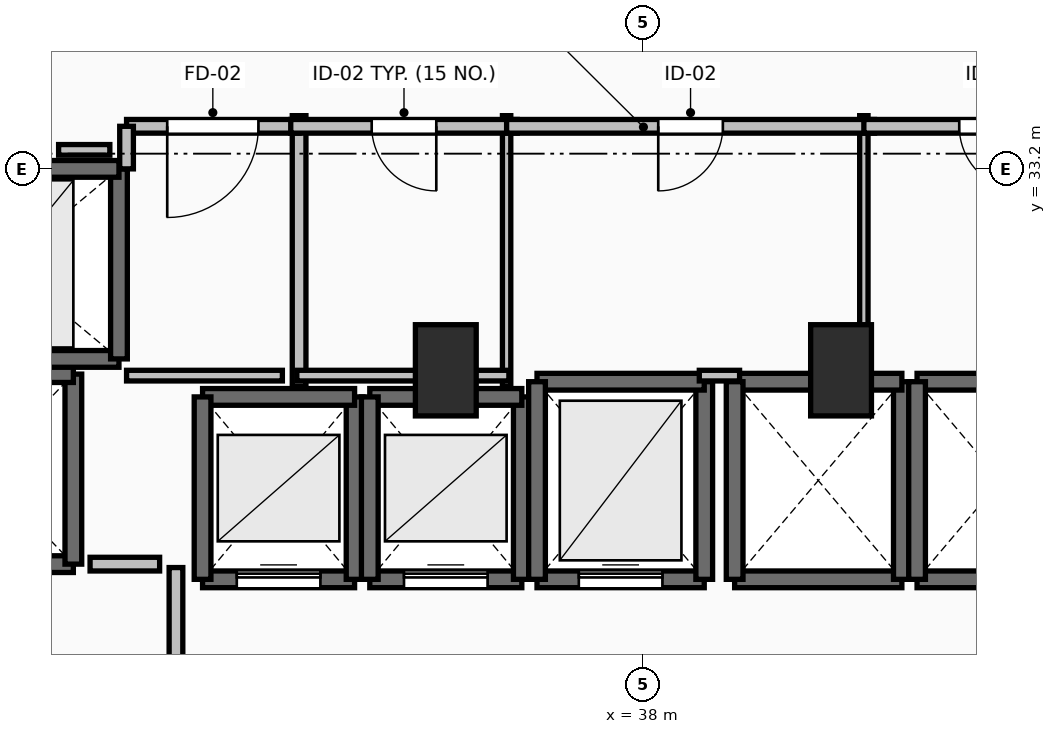
"""IFC4 building model, lengths in metres.
Left out: names, types, materials, properties, quantities, classifications, styles, units other than length and angle.
Written with IfcOpenShell. Run it as: python <this file> out.ifc"""

import sys

from ifc_helpers import new_model, si_unit, direction, frame, frame_2d, origin, origin_2d, place, context, subcontext, project, spatial, rectangle, extrude, element, fill, save


model = new_model("IFC4")
c1 = context("Model", 3, precision=1e-05, world=origin(), true_north=direction((0.0, 1.0)))
c2 = subcontext(c1, "Body", "Model", "MODEL_VIEW")
j1 = project(units=[si_unit("LENGTHUNIT", "METRE"), si_unit("PLANEANGLEUNIT", "RADIAN")], contexts=[c1])
p1 = place(None, origin())
s1 = spatial("IfcSite", under=j1, at=p1, CompositionType="ELEMENT")
p2 = place(p1, origin())
s2 = spatial("IfcBuilding", under=s1, at=p2, CompositionType="ELEMENT")
p3 = place(p2, frame((0.0, 0.0, 117.3)))
s3 = spatial("IfcBuildingStorey", under=s2, at=p3, CompositionType="ELEMENT", Elevation=117.3)
for number, where, z_axis, x_axis in (
    (1, (35.4, 30.55, 0.0), (0.0, 0.0, 1.0), (1.0, 0.0, 0.0)),
    (2, (40.6, 30.55, 0.0), (0.0, 0.0, 1.0), (1.0, 0.0, 0.0)),
):
    element("IfcColumn", number, at=place(p3, frame(where, z_axis=z_axis, x_axis=x_axis)), inside=s3, PredefinedType="PILASTER", context=c2, shape_type="SweptSolid", body=[
        extrude(rectangle(XDim=0.8, YDim=1.2, at=origin_2d()), origin(), (0.0, 0.0, 1.0), 3.5),
    ])
p4 = place(p3, frame((32.2, 27.8, 0.0), z_axis=(0.0, 0.0, 1.0), x_axis=(1.0, 0.0, 0.0)))
e3 = element("IfcWall", 3, at=p4, inside=s3, PredefinedType="SOLIDWALL", context=c2, shape_type="SweptSolid", body=[
    extrude(rectangle(XDim=2.0, YDim=0.22, at=frame_2d((1.0, 0.0))), origin(), (0.0, 0.0, 1.0), 3.24),
])
p5 = place(p4, frame((0.45, 0.0, 0.0)))
e4 = element("IfcOpeningElement", 4, at=p5, cuts=e3, PredefinedType="OPENING", context=c2, shape_type="SweptSolid", body=[
    extrude(rectangle(XDim=1.1, YDim=2.2, at=frame_2d((0.55, 1.1))), frame((0.0, 0.125, 0.0), z_axis=(0.0, -1.0, 0.0), x_axis=(1.0, 0.0, 0.0)), (0.0, 0.0, 1.0), 0.25),
])
p6 = place(p3, frame((34.2, 27.8, 0.0), z_axis=(0.0, 0.0, 1.0), x_axis=(0.0, 1.0, 0.0)))
e5 = element("IfcWall", 5, at=p6, inside=s3, PredefinedType="SOLIDWALL", context=c2, shape_type="SweptSolid", body=[
    extrude(rectangle(XDim=2.4, YDim=0.22, at=frame_2d((1.2, 0.0))), origin(), (0.0, 0.0, 1.0), 3.24),
])
p7 = place(p3, frame((34.2, 30.2, 0.0), z_axis=(0.0, 0.0, 1.0), x_axis=(-1.0, 0.0, 0.0)))
e6 = element("IfcWall", 6, at=p7, inside=s3, PredefinedType="SOLIDWALL", context=c2, shape_type="SweptSolid", body=[
    extrude(rectangle(XDim=2.0, YDim=0.22, at=frame_2d((1.0, 0.0))), origin(), (0.0, 0.0, 1.0), 3.24),
])
p8 = place(p3, frame((32.2, 30.2, 0.0), z_axis=(0.0, 0.0, 1.0), x_axis=(0.0, -1.0, 0.0)))
e7 = element("IfcWall", 7, at=p8, inside=s3, PredefinedType="SOLIDWALL", context=c2, shape_type="SweptSolid", body=[
    extrude(rectangle(XDim=2.4, YDim=0.22, at=frame_2d((1.2, 0.0))), origin(), (0.0, 0.0, 1.0), 3.24),
])
p9 = place(p3, frame((34.4, 27.8, 0.0), z_axis=(0.0, 0.0, 1.0), x_axis=(1.0, 0.0, 0.0)))
e8 = element("IfcWall", 8, at=p9, inside=s3, PredefinedType="SOLIDWALL", context=c2, shape_type="SweptSolid", body=[
    extrude(rectangle(XDim=2.0, YDim=0.22, at=frame_2d((1.0, 0.0))), origin(), (0.0, 0.0, 1.0), 3.24),
])
p10 = place(p9, frame((0.45, 0.0, 0.0)))
e9 = element("IfcOpeningElement", 9, at=p10, cuts=e8, PredefinedType="OPENING", context=c2, shape_type="SweptSolid", body=[
    extrude(rectangle(XDim=1.1, YDim=2.2, at=frame_2d((0.55, 1.1))), frame((0.0, 0.125, 0.0), z_axis=(0.0, -1.0, 0.0), x_axis=(1.0, 0.0, 0.0)), (0.0, 0.0, 1.0), 0.25),
])
p11 = place(p3, frame((36.4, 27.8, 0.0), z_axis=(0.0, 0.0, 1.0), x_axis=(0.0, 1.0, 0.0)))
e10 = element("IfcWall", 10, at=p11, inside=s3, PredefinedType="SOLIDWALL", context=c2, shape_type="SweptSolid", body=[
    extrude(rectangle(XDim=2.4, YDim=0.22, at=frame_2d((1.2, 0.0))), origin(), (0.0, 0.0, 1.0), 3.24),
])
p12 = place(p3, frame((36.4, 30.2, 0.0), z_axis=(0.0, 0.0, 1.0), x_axis=(-1.0, 0.0, 0.0)))
e11 = element("IfcWall", 11, at=p12, inside=s3, PredefinedType="SOLIDWALL", context=c2, shape_type="SweptSolid", body=[
    extrude(rectangle(XDim=2.0, YDim=0.22, at=frame_2d((1.0, 0.0))), origin(), (0.0, 0.0, 1.0), 3.24),
])
p13 = place(p3, frame((34.4, 30.2, 0.0), z_axis=(0.0, 0.0, 1.0), x_axis=(0.0, -1.0, 0.0)))
e12 = element("IfcWall", 12, at=p13, inside=s3, PredefinedType="SOLIDWALL", context=c2, shape_type="SweptSolid", body=[
    extrude(rectangle(XDim=2.4, YDim=0.22, at=frame_2d((1.2, 0.0))), origin(), (0.0, 0.0, 1.0), 3.24),
])
p14 = place(p3, frame((36.6, 27.8, 0.0), z_axis=(0.0, 0.0, 1.0), x_axis=(1.0, 0.0, 0.0)))
e13 = element("IfcWall", 13, at=p14, inside=s3, PredefinedType="SOLIDWALL", context=c2, shape_type="SweptSolid", body=[
    extrude(rectangle(XDim=2.2, YDim=0.22, at=frame_2d((1.1, 0.0))), origin(), (0.0, 0.0, 1.0), 3.24),
])
p15 = place(p14, frame((0.55, 0.0, 0.0)))
e14 = element("IfcOpeningElement", 14, at=p15, cuts=e13, PredefinedType="OPENING", context=c2, shape_type="SweptSolid", body=[
    extrude(rectangle(XDim=1.1, YDim=2.2, at=frame_2d((0.55, 1.1))), frame((0.0, 0.125, 0.0), z_axis=(0.0, -1.0, 0.0), x_axis=(1.0, 0.0, 0.0)), (0.0, 0.0, 1.0), 0.25),
])
p16 = place(p3, frame((38.8, 27.8, 0.0), z_axis=(0.0, 0.0, 1.0), x_axis=(0.0, 1.0, 0.0)))
e15 = element("IfcWall", 15, at=p16, inside=s3, PredefinedType="SOLIDWALL", context=c2, shape_type="SweptSolid", body=[
    extrude(rectangle(XDim=2.6, YDim=0.22, at=frame_2d((1.3, 0.0))), origin(), (0.0, 0.0, 1.0), 3.24),
])
p17 = place(p3, frame((38.8, 30.4, 0.0), z_axis=(0.0, 0.0, 1.0), x_axis=(-1.0, 0.0, 0.0)))
e16 = element("IfcWall", 16, at=p17, inside=s3, PredefinedType="SOLIDWALL", context=c2, shape_type="SweptSolid", body=[
    extrude(rectangle(XDim=2.2, YDim=0.22, at=frame_2d((1.1, 0.0))), origin(), (0.0, 0.0, 1.0), 3.24),
])
p18 = place(p3, frame((36.6, 30.4, 0.0), z_axis=(0.0, 0.0, 1.0), x_axis=(0.0, -1.0, 0.0)))
e17 = element("IfcWall", 17, at=p18, inside=s3, PredefinedType="SOLIDWALL", context=c2, shape_type="SweptSolid", body=[
    extrude(rectangle(XDim=2.6, YDim=0.22, at=frame_2d((1.3, 0.0))), origin(), (0.0, 0.0, 1.0), 3.24),
])
p19 = place(p3, frame((39.2, 27.8, 0.0), z_axis=(0.0, 0.0, 1.0), x_axis=(1.0, 0.0, 0.0)))
e18 = element("IfcWall", 18, at=p19, inside=s3, PredefinedType="SOLIDWALL", context=c2, shape_type="SweptSolid", body=[
    extrude(rectangle(XDim=2.2, YDim=0.22, at=frame_2d((1.1, 0.0))), origin(), (0.0, 0.0, 1.0), 3.24),
])
p20 = place(p3, frame((41.4, 27.8, 0.0), z_axis=(0.0, 0.0, 1.0), x_axis=(0.0, 1.0, 0.0)))
e19 = element("IfcWall", 19, at=p20, inside=s3, PredefinedType="SOLIDWALL", context=c2, shape_type="SweptSolid", body=[
    extrude(rectangle(XDim=2.6, YDim=0.22, at=frame_2d((1.3, 0.0))), origin(), (0.0, 0.0, 1.0), 3.24),
])
p21 = place(p3, frame((41.4, 30.4, 0.0), z_axis=(0.0, 0.0, 1.0), x_axis=(-1.0, 0.0, 0.0)))
e20 = element("IfcWall", 20, at=p21, inside=s3, PredefinedType="SOLIDWALL", context=c2, shape_type="SweptSolid", body=[
    extrude(rectangle(XDim=2.2, YDim=0.22, at=frame_2d((1.1, 0.0))), origin(), (0.0, 0.0, 1.0), 3.24),
])
p22 = place(p3, frame((39.2, 30.4, 0.0), z_axis=(0.0, 0.0, 1.0), x_axis=(0.0, -1.0, 0.0)))
e21 = element("IfcWall", 21, at=p22, inside=s3, PredefinedType="SOLIDWALL", context=c2, shape_type="SweptSolid", body=[
    extrude(rectangle(XDim=2.6, YDim=0.22, at=frame_2d((1.3, 0.0))), origin(), (0.0, 0.0, 1.0), 3.24),
])
for number, where, z_axis, x_axis in (
    (22, (41.6, 27.8, 0.0), (0.0, 0.0, 1.0), (1.0, 0.0, 0.0)),
    (23, (43.8, 30.4, 0.0), (0.0, 0.0, 1.0), (-1.0, 0.0, 0.0)),
):
    element("IfcWall", number, at=place(p3, frame(where, z_axis=z_axis, x_axis=x_axis)), inside=s3, PredefinedType="SOLIDWALL", context=c2, shape_type="SweptSolid", body=[
        extrude(rectangle(XDim=2.2, YDim=0.22, at=frame_2d((1.1, 0.0))), origin(), (0.0, 0.0, 1.0), 3.24),
    ])
p23 = place(p3, frame((41.6, 30.4, 0.0), z_axis=(0.0, 0.0, 1.0), x_axis=(0.0, -1.0, 0.0)))
e24 = element("IfcWall", 24, at=p23, inside=s3, PredefinedType="SOLIDWALL", context=c2, shape_type="SweptSolid", body=[
    extrude(rectangle(XDim=2.6, YDim=0.22, at=frame_2d((1.3, 0.0))), origin(), (0.0, 0.0, 1.0), 3.24),
])
p24 = place(p3, frame((28.1, 28.0, 0.0), z_axis=(0.0, 0.0, 1.0), x_axis=(1.0, 0.0, 0.0)))
e25 = element("IfcWall", 25, at=p24, inside=s3, PredefinedType="SHEAR", context=c2, shape_type="SweptSolid", body=[
    extrude(rectangle(XDim=2.4, YDim=0.22, at=frame_2d((1.2, 0.0))), origin(), (0.0, 0.0, 1.0), 3.24),
])
p25 = place(p24, frame((0.6, 0.0, 0.0)))
e26 = element("IfcOpeningElement", 26, at=p25, cuts=e25, PredefinedType="OPENING", context=c2, shape_type="SweptSolid", body=[
    extrude(rectangle(XDim=1.2, YDim=2.2, at=frame_2d((0.6, 1.1))), frame((0.0, 0.125, 0.0), z_axis=(0.0, -1.0, 0.0), x_axis=(1.0, 0.0, 0.0)), (0.0, 0.0, 1.0), 0.25),
])
p26 = place(p3, frame((30.5, 28.0, 0.0), z_axis=(0.0, 0.0, 1.0), x_axis=(0.0, 1.0, 0.0)))
e27 = element("IfcWall", 27, at=p26, inside=s3, PredefinedType="SHEAR", context=c2, shape_type="SweptSolid", body=[
    extrude(rectangle(XDim=2.5, YDim=0.22, at=frame_2d((1.25, 0.0))), origin(), (0.0, 0.0, 1.0), 3.24),
])
p27 = place(p3, frame((30.5, 30.5, 0.0), z_axis=(0.0, 0.0, 1.0), x_axis=(-1.0, 0.0, 0.0)))
e28 = element("IfcWall", 28, at=p27, inside=s3, PredefinedType="SHEAR", context=c2, shape_type="SweptSolid", body=[
    extrude(rectangle(XDim=2.4, YDim=0.22, at=frame_2d((1.2, 0.0))), origin(), (0.0, 0.0, 1.0), 3.24),
])
p28 = place(p3, frame((28.1, 30.7, 0.0), z_axis=(0.0, 0.0, 1.0), x_axis=(1.0, 0.0, 0.0)))
e29 = element("IfcWall", 29, at=p28, inside=s3, PredefinedType="SOLIDWALL", context=c2, shape_type="SweptSolid", body=[
    extrude(rectangle(XDim=3.0, YDim=0.22, at=frame_2d((1.5, 0.0))), origin(), (0.0, 0.0, 1.0), 3.24),
])
p29 = place(p3, frame((31.1, 30.7, 0.0), z_axis=(0.0, 0.0, 1.0), x_axis=(0.0, 1.0, 0.0)))
e30 = element("IfcWall", 30, at=p29, inside=s3, PredefinedType="SOLIDWALL", context=c2, shape_type="SweptSolid", body=[
    extrude(rectangle(XDim=2.5, YDim=0.22, at=frame_2d((1.25, 0.0))), origin(), (0.0, 0.0, 1.0), 3.24),
])
p30 = place(p3, frame((31.1, 33.2, 0.0), z_axis=(0.0, 0.0, 1.0), x_axis=(-1.0, 0.0, 0.0)))
e31 = element("IfcWall", 31, at=p30, inside=s3, PredefinedType="SOLIDWALL", context=c2, shape_type="SweptSolid", body=[
    extrude(rectangle(XDim=3.0, YDim=0.22, at=frame_2d((1.5, 0.0))), origin(), (0.0, 0.0, 1.0), 3.24),
])
p31 = place(p30, frame((0.9, 0.0, 0.0)))
e32 = element("IfcOpeningElement", 32, at=p31, cuts=e31, PredefinedType="OPENING", context=c2, shape_type="SweptSolid", body=[
    extrude(rectangle(XDim=1.2, YDim=2.2, at=frame_2d((0.6, 1.1))), frame((0.0, 0.125, 0.0), z_axis=(0.0, -1.0, 0.0), x_axis=(1.0, 0.0, 0.0)), (0.0, 0.0, 1.0), 0.25),
])
p32 = place(p3, frame((31.85, 24.045, 0.0), z_axis=(0.0, 0.0, 1.0), x_axis=(0.0, 1.0, 0.0)))
e33 = element("IfcWall", 33, at=p32, inside=s3, PredefinedType="PARTITIONING", context=c2, shape_type="SweptSolid", body=[
    extrude(rectangle(XDim=3.91, YDim=0.18, at=frame_2d((1.955, 0.0))), origin(), (0.0, 0.0, 1.0), 3.24),
])
p33 = place(p32, frame((1.355, 0.0, 0.0)))
e34 = element("IfcOpeningElement", 34, at=p33, cuts=e33, PredefinedType="OPENING", context=c2, shape_type="SweptSolid", body=[
    extrude(rectangle(XDim=1.2, YDim=2.15, at=frame_2d((0.6, 1.075))), frame((0.0, 0.105, 0.0), z_axis=(0.0, -1.0, 0.0), x_axis=(1.0, 0.0, 0.0)), (0.0, 0.0, 1.0), 0.21),
])
p34 = place(p3, frame((33.47, 30.34, 0.0), z_axis=(0.0, 0.0, 1.0), x_axis=(0.0, 1.0, 0.0)))
e35 = element("IfcWall", 35, at=p34, inside=s3, PredefinedType="PARTITIONING", context=c2, shape_type="SweptSolid", body=[
    extrude(rectangle(XDim=3.56, YDim=0.18, at=frame_2d((1.78, 0.0))), origin(), (0.0, 0.0, 1.0), 3.24),
])
p35 = place(p3, frame((33.47, 33.76, 0.0), z_axis=(0.0, 0.0, 1.0), x_axis=(-1.0, 0.0, 0.0)))
e36 = element("IfcWall", 36, at=p35, inside=s3, PredefinedType="PARTITIONING", context=c2, shape_type="SweptSolid", body=[
    extrude(rectangle(XDim=2.27, YDim=0.18, at=frame_2d((1.135, 0.0))), origin(), (0.0, 0.0, 1.0), 3.24),
])
p36 = place(p35, frame((0.535, 0.0, 0.0)))
e37 = element("IfcOpeningElement", 37, at=p36, cuts=e36, PredefinedType="OPENING", context=c2, shape_type="SweptSolid", body=[
    extrude(rectangle(XDim=1.2, YDim=2.15, at=frame_2d((0.6, 1.075))), frame((0.0, 0.105, 0.0), z_axis=(0.0, -1.0, 0.0), x_axis=(1.0, 0.0, 0.0)), (0.0, 0.0, 1.0), 0.21),
])
p37 = place(p3, frame((31.2, 33.76, 0.0), z_axis=(0.0, 0.0, 1.0), x_axis=(0.0, -1.0, 0.0)))
e38 = element("IfcWall", 38, at=p37, inside=s3, PredefinedType="PARTITIONING", context=c2, shape_type="SweptSolid", body=[
    extrude(rectangle(XDim=0.56, YDim=0.18, at=frame_2d((0.28, 0.0))), origin(), (0.0, 0.0, 1.0), 3.24),
])
p38 = place(p3, frame((36.2, 30.34, 0.0), z_axis=(0.0, 0.0, 1.0), x_axis=(0.0, 1.0, 0.0)))
e39 = element("IfcWall", 39, at=p38, inside=s3, PredefinedType="PARTITIONING", context=c2, shape_type="SweptSolid", body=[
    extrude(rectangle(XDim=3.56, YDim=0.11, at=frame_2d((1.78, 0.0))), origin(), (0.0, 0.0, 1.0), 2.432),
])
p39 = place(p3, frame((36.34, 33.76, 0.0), z_axis=(0.0, 0.0, 1.0), x_axis=(-1.0, 0.0, 0.0)))
e40 = element("IfcWall", 40, at=p39, inside=s3, PredefinedType="PARTITIONING", context=c2, shape_type="SweptSolid", body=[
    extrude(rectangle(XDim=2.98, YDim=0.18, at=frame_2d((1.49, 0.0))), origin(), (0.0, 0.0, 1.0), 3.24),
])
p40 = place(p39, frame((1.065, 0.0, 0.0)))
e41 = element("IfcOpeningElement", 41, at=p40, cuts=e40, PredefinedType="OPENING", context=c2, shape_type="SweptSolid", body=[
    extrude(rectangle(XDim=0.85, YDim=2.1, at=frame_2d((0.425, 1.05))), frame((0.0, 0.105, 0.0), z_axis=(0.0, -1.0, 0.0), x_axis=(1.0, 0.0, 0.0)), (0.0, 0.0, 1.0), 0.21),
])
p41 = place(p3, frame((40.9, 30.34, 0.0), z_axis=(0.0, 0.0, 1.0), x_axis=(0.0, 1.0, 0.0)))
e42 = element("IfcWall", 42, at=p41, inside=s3, PredefinedType="PARTITIONING", context=c2, shape_type="SweptSolid", body=[
    extrude(rectangle(XDim=3.56, YDim=0.11, at=frame_2d((1.78, 0.0))), origin(), (0.0, 0.0, 1.0), 3.24),
])
p42 = place(p3, frame((41.04, 33.76, 0.0), z_axis=(0.0, 0.0, 1.0), x_axis=(-1.0, 0.0, 0.0)))
e43 = element("IfcWall", 43, at=p42, inside=s3, PredefinedType="PARTITIONING", context=c2, shape_type="SweptSolid", body=[
    extrude(rectangle(XDim=4.84, YDim=0.18, at=frame_2d((2.42, 0.0))), origin(), (0.0, 0.0, 1.0), 3.24),
])
p43 = place(p42, frame((1.995, 0.0, 0.0)))
e44 = element("IfcOpeningElement", 44, at=p43, cuts=e43, PredefinedType="OPENING", context=c2, shape_type="SweptSolid", body=[
    extrude(rectangle(XDim=0.85, YDim=2.1, at=frame_2d((0.425, 1.05))), frame((0.0, 0.105, 0.0), z_axis=(0.0, -1.0, 0.0), x_axis=(1.0, 0.0, 0.0)), (0.0, 0.0, 1.0), 0.21),
])
p44 = place(p3, frame((44.26, 33.76, 0.0), z_axis=(0.0, 0.0, 1.0), x_axis=(-1.0, 0.0, 0.0)))
e45 = element("IfcWall", 45, at=p44, inside=s3, PredefinedType="PARTITIONING", context=c2, shape_type="SweptSolid", body=[
    extrude(rectangle(XDim=3.36, YDim=0.18, at=frame_2d((1.68, 0.0))), origin(), (0.0, 0.0, 1.0), 3.24),
])
p45 = place(p44, frame((1.255, 0.0, 0.0)))
e46 = element("IfcOpeningElement", 46, at=p45, cuts=e45, PredefinedType="OPENING", context=c2, shape_type="SweptSolid", body=[
    extrude(rectangle(XDim=0.85, YDim=2.1, at=frame_2d((0.425, 1.05))), frame((0.0, 0.105, 0.0), z_axis=(0.0, -1.0, 0.0), x_axis=(1.0, 0.0, 0.0)), (0.0, 0.0, 1.0), 0.21),
])
p46 = place(p3, frame((31.635, 28.0, 0.0), z_axis=(0.0, 0.0, 1.0), x_axis=(-1.0, 0.0, 0.0)))
e47 = element("IfcWall", 47, at=p46, inside=s3, PredefinedType="PARTITIONING", context=c2, shape_type="SweptSolid", body=[
    extrude(rectangle(XDim=0.915, YDim=0.18, at=frame_2d((0.458, 0.0))), origin(), (0.0, 0.0, 1.0), 3.24),
])
p47 = place(p3, frame((31.2, 30.48, 0.0), z_axis=(0.0, 0.0, 1.0), x_axis=(1.0, 0.0, 0.0)))
e48 = element("IfcWall", 48, at=p47, inside=s3, PredefinedType="PARTITIONING", context=c2, shape_type="SweptSolid", body=[
    extrude(rectangle(XDim=2.05, YDim=0.14, at=frame_2d((1.025, 0.0))), origin(), (0.0, 0.0, 1.0), 3.24),
])
p48 = place(p3, frame((33.44, 30.48, 0.0), z_axis=(0.0, 0.0, 1.0), x_axis=(1.0, 0.0, 0.0)))
e49 = element("IfcWall", 49, at=p48, inside=s3, PredefinedType="PARTITIONING", context=c2, shape_type="SweptSolid", body=[
    extrude(rectangle(XDim=2.79, YDim=0.14, at=frame_2d((1.395, 0.0))), origin(), (0.0, 0.0, 1.0), 2.432),
])
p49 = place(p3, frame((38.735, 30.48, 0.0), z_axis=(0.0, 0.0, 1.0), x_axis=(1.0, 0.0, 0.0)))
e50 = element("IfcWall", 50, at=p49, inside=s3, PredefinedType="PARTITIONING", context=c2, shape_type="SweptSolid", body=[
    extrude(rectangle(XDim=0.53, YDim=0.14, at=frame_2d((0.265, 0.0))), origin(), (0.0, 0.0, 1.0), 2.432),
])
p50 = place(p3, frame((30.306, 33.45, 0.0), z_axis=(0.0, 0.0, 1.0), x_axis=(1.0, 0.0, 0.0)))
e51 = element("IfcWall", 51, at=p50, inside=s3, PredefinedType="PARTITIONING", context=c2, shape_type="SweptSolid", body=[
    extrude(rectangle(XDim=0.674, YDim=0.14, at=frame_2d((0.337, 0.0))), origin(), (0.0, 0.0, 1.0), 3.24),
])
p51 = place(p5, origin())
e52 = element("IfcDoor", 52, at=p51, inside=s3, OperationType="SLIDING_TO_LEFT", PredefinedType="DOOR", context=c2, shape_type="SweptSolid", body=[
    extrude(rectangle(XDim=1.1, YDim=2.2, at=frame_2d((0.55, 1.1))), frame((0.0, 0.025, 0.0), z_axis=(0.0, -1.0, 0.0), x_axis=(1.0, 0.0, 0.0)), (0.0, 0.0, 1.0), 0.05),
])
fill(e4, e52)
p52 = place(p10, origin())
e53 = element("IfcDoor", 53, at=p52, inside=s3, OperationType="SLIDING_TO_LEFT", PredefinedType="DOOR", context=c2, shape_type="SweptSolid", body=[
    extrude(rectangle(XDim=1.1, YDim=2.2, at=frame_2d((0.55, 1.1))), frame((0.0, 0.025, 0.0), z_axis=(0.0, -1.0, 0.0), x_axis=(1.0, 0.0, 0.0)), (0.0, 0.0, 1.0), 0.05),
])
fill(e9, e53)
p53 = place(p15, origin())
e54 = element("IfcDoor", 54, at=p53, inside=s3, OperationType="SLIDING_TO_LEFT", PredefinedType="DOOR", context=c2, shape_type="SweptSolid", body=[
    extrude(rectangle(XDim=1.1, YDim=2.2, at=frame_2d((0.55, 1.1))), frame((0.0, 0.025, 0.0), z_axis=(0.0, -1.0, 0.0), x_axis=(1.0, 0.0, 0.0)), (0.0, 0.0, 1.0), 0.05),
])
fill(e14, e54)
p54 = place(p36, origin())
e55 = element("IfcDoor", 55, at=p54, inside=s3, OperationType="SINGLE_SWING_RIGHT", PredefinedType="DOOR", context=c2, shape_type="SweptSolid", body=[
    extrude(rectangle(XDim=1.2, YDim=2.15, at=frame_2d((0.6, 1.075))), frame((0.0, 0.025, 0.0), z_axis=(0.0, -1.0, 0.0), x_axis=(1.0, 0.0, 0.0)), (0.0, 0.0, 1.0), 0.05),
])
fill(e37, e55)
p55 = place(p40, origin())
e56 = element("IfcDoor", 56, at=p55, inside=s3, OperationType="SINGLE_SWING_LEFT", PredefinedType="DOOR", context=c2, shape_type="SweptSolid", body=[
    extrude(rectangle(XDim=0.85, YDim=2.1, at=frame_2d((0.425, 1.05))), frame((0.0, 0.025, 0.0), z_axis=(0.0, -1.0, 0.0), x_axis=(1.0, 0.0, 0.0)), (0.0, 0.0, 1.0), 0.05),
])
fill(e41, e56)
p56 = place(p43, origin())
e57 = element("IfcDoor", 57, at=p56, inside=s3, OperationType="SINGLE_SWING_RIGHT", PredefinedType="DOOR", context=c2, shape_type="SweptSolid", body=[
    extrude(rectangle(XDim=0.85, YDim=2.1, at=frame_2d((0.425, 1.05))), frame((0.0, 0.025, 0.0), z_axis=(0.0, -1.0, 0.0), x_axis=(1.0, 0.0, 0.0)), (0.0, 0.0, 1.0), 0.05),
])
fill(e44, e57)
p57 = place(p45, origin())
e58 = element("IfcDoor", 58, at=p57, inside=s3, OperationType="SINGLE_SWING_LEFT", PredefinedType="DOOR", context=c2, shape_type="SweptSolid", body=[
    extrude(rectangle(XDim=0.85, YDim=2.1, at=frame_2d((0.425, 1.05))), frame((0.0, 0.025, 0.0), z_axis=(0.0, -1.0, 0.0), x_axis=(1.0, 0.0, 0.0)), (0.0, 0.0, 1.0), 0.05),
])
fill(e46, e58)
save(model, sys.argv[1])
